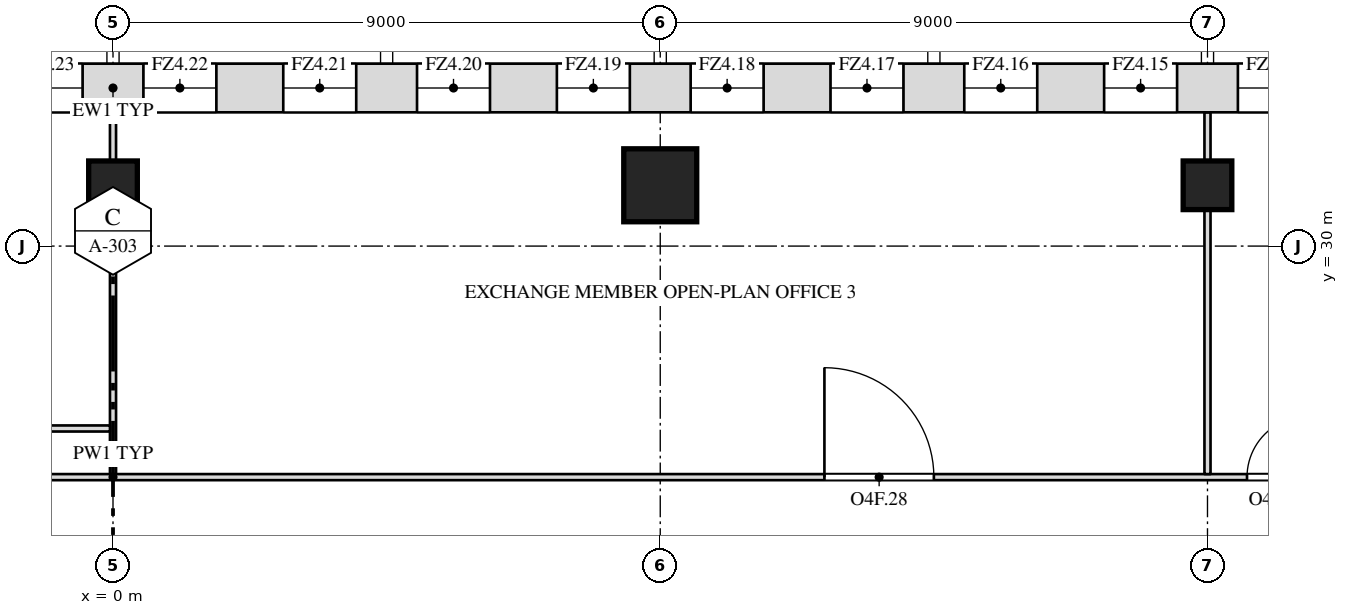
"""IFC4 building model, lengths in metres.
Left out: names, types, materials, properties, quantities, classifications, styles, units other than length and angle.
Written with IfcOpenShell. Run it as: python <this file> out.ifc"""

import sys

from ifc_helpers import new_model, si_unit, direction, frame, frame_2d, origin, origin_2d, place, context, subcontext, project, spatial, rectangle, extrude, element, fill, save


model = new_model("IFC4")
c1 = context("Model", 3, precision=1e-05, world=origin(), true_north=direction((0.0, 1.0)))
c2 = subcontext(c1, "Body", "Model", "MODEL_VIEW")
j1 = project(units=[si_unit("LENGTHUNIT", "METRE"), si_unit("PLANEANGLEUNIT", "RADIAN")], contexts=[c1])
p1 = place(None, origin())
s1 = spatial("IfcSite", under=j1, at=p1, CompositionType="ELEMENT")
p2 = place(p1, origin())
s2 = spatial("IfcBuilding", under=s1, at=p2, CompositionType="ELEMENT")
p3 = place(p2, frame((0.0, 0.0, 260.5)))
s3 = spatial("IfcBuildingStorey", under=s2, at=p3, CompositionType="ELEMENT", Elevation=260.5)
p4 = place(p3, frame((0.0, 31.0, 0.0), z_axis=(0.0, 0.0, 1.0), x_axis=(1.0, 0.0, 0.0)))
e1 = element("IfcColumn", 1, at=p4, inside=s3, PredefinedType="COLUMN", context=c2, shape_type="SweptSolid", body=[
    extrude(rectangle(XDim=0.8, YDim=0.8, at=origin_2d()), origin(), (0.0, 0.0, 1.0), 4.0),
])
p5 = place(p3, frame((9.0, 31.0, 0.0), z_axis=(0.0, 0.0, 1.0), x_axis=(1.0, 0.0, 0.0)))
e2 = element("IfcColumn", 2, at=p5, inside=s3, PredefinedType="COLUMN", context=c2, shape_type="SweptSolid", body=[
    extrude(rectangle(XDim=1.2, YDim=1.2, at=origin_2d()), origin(), (0.0, 0.0, 1.0), 4.0),
])
p6 = place(p3, frame((18.0, 31.0, 0.0), z_axis=(0.0, 0.0, 1.0), x_axis=(1.0, 0.0, 0.0)))
e3 = element("IfcColumn", 3, at=p6, inside=s3, PredefinedType="COLUMN", context=c2, shape_type="SweptSolid", body=[
    extrude(rectangle(XDim=0.8, YDim=0.8, at=origin_2d()), origin(), (0.0, 0.0, 1.0), 4.0),
])
p7 = place(p3, frame((-35.2, 26.2, 0.0), z_axis=(0.0, 0.0, 1.0), x_axis=(1.0, 0.0, 0.0)))
e4 = element("IfcWall", 4, at=p7, inside=s3, PredefinedType="PARTITIONING", context=c2, shape_type="SweptSolid", body=[
    extrude(rectangle(XDim=70.4, YDim=0.1, at=frame_2d((35.2, 0.0))), origin(), (0.0, 0.0, 1.0), 3.7),
])
p8 = place(p7, frame((10.9, 0.0, 0.0)))
e5 = element("IfcOpeningElement", 5, at=p8, cuts=e4, PredefinedType="OPENING", context=c2, shape_type="SweptSolid", body=[
    extrude(rectangle(XDim=1.0, YDim=2.1, at=frame_2d((0.5, 1.05))), frame((0.0, 0.062, 0.0), z_axis=(0.0, -1.0, 0.0), x_axis=(1.0, 0.0, 0.0)), (0.0, 0.0, 1.0), 0.124),
])
p9 = place(p7, frame((17.85, 0.0, 0.0)))
e6 = element("IfcOpeningElement", 6, at=p9, cuts=e4, PredefinedType="OPENING", context=c2, shape_type="SweptSolid", body=[
    extrude(rectangle(XDim=1.0, YDim=2.1, at=frame_2d((0.5, 1.05))), frame((0.0, 0.062, 0.0), z_axis=(0.0, -1.0, 0.0), x_axis=(1.0, 0.0, 0.0)), (0.0, 0.0, 1.0), 0.124),
])
p10 = place(p7, frame((46.9, 0.0, 0.0)))
e7 = element("IfcOpeningElement", 7, at=p10, cuts=e4, PredefinedType="OPENING", context=c2, shape_type="SweptSolid", body=[
    extrude(rectangle(XDim=1.8, YDim=2.1, at=frame_2d((0.9, 1.05))), frame((0.0, 0.062, 0.0), z_axis=(0.0, -1.0, 0.0), x_axis=(1.0, 0.0, 0.0)), (0.0, 0.0, 1.0), 0.124),
])
p11 = place(p7, frame((53.85, 0.0, 0.0)))
e8 = element("IfcOpeningElement", 8, at=p11, cuts=e4, PredefinedType="OPENING", context=c2, shape_type="SweptSolid", body=[
    extrude(rectangle(XDim=1.0, YDim=2.1, at=frame_2d((0.5, 1.05))), frame((0.0, 0.062, 0.0), z_axis=(0.0, -1.0, 0.0), x_axis=(1.0, 0.0, 0.0)), (0.0, 0.0, 1.0), 0.124),
])
p12 = place(p3, frame((0.0, 26.25, 0.0), z_axis=(0.0, 0.0, 1.0), x_axis=(0.0, 1.0, 0.0)))
e9 = element("IfcWall", 9, at=p12, inside=s3, PredefinedType="PARTITIONING", context=c2, shape_type="SweptSolid", body=[
    extrude(rectangle(XDim=4.35, YDim=0.1, at=frame_2d((2.175, 0.0))), origin(), (0.0, 0.0, 1.0), 3.093),
])
p13 = place(p3, frame((0.0, 31.4, 0.0), z_axis=(0.0, 0.0, 1.0), x_axis=(0.0, 1.0, 0.0)))
e10 = element("IfcWall", 10, at=p13, inside=s3, PredefinedType="PARTITIONING", context=c2, shape_type="SweptSolid", body=[
    extrude(rectangle(XDim=0.8, YDim=0.1, at=frame_2d((0.4, 0.0))), origin(), (0.0, 0.0, 1.0), 3.7),
])
p14 = place(p3, frame((18.0, 26.25, 0.0), z_axis=(0.0, 0.0, 1.0), x_axis=(0.0, 1.0, 0.0)))
e11 = element("IfcWall", 11, at=p14, inside=s3, PredefinedType="PARTITIONING", context=c2, shape_type="SweptSolid", body=[
    extrude(rectangle(XDim=4.35, YDim=0.1, at=frame_2d((2.175, 0.0))), origin(), (0.0, 0.0, 1.0), 3.093),
])
p15 = place(p3, frame((18.0, 31.4, 0.0), z_axis=(0.0, 0.0, 1.0), x_axis=(0.0, 1.0, 0.0)))
e12 = element("IfcWall", 12, at=p15, inside=s3, PredefinedType="PARTITIONING", context=c2, shape_type="SweptSolid", body=[
    extrude(rectangle(XDim=0.8, YDim=0.1, at=frame_2d((0.4, 0.0))), origin(), (0.0, 0.0, 1.0), 3.7),
])
p16 = place(p3, frame((-9.05, 27.0, 0.0), z_axis=(0.0, 0.0, 1.0), x_axis=(1.0, 0.0, 0.0)))
e13 = element("IfcWall", 13, at=p16, inside=s3, PredefinedType="PARTITIONING", context=c2, shape_type="SweptSolid", body=[
    extrude(rectangle(XDim=9.0, YDim=0.1, at=frame_2d((4.5, 0.0))), origin(), (0.0, 0.0, 1.0), 3.7),
])
p17 = place(p3, frame((29.948, 32.6, 0.0), z_axis=(0.0, 0.0, 1.0), x_axis=(-1.0, 0.0, 0.0)))
e14 = element("IfcWall", 14, at=p17, inside=s3, PredefinedType="SOLIDWALL", context=c2, shape_type="SweptSolid", body=[
    extrude(rectangle(XDim=59.895, YDim=0.8, at=frame_2d((29.948, 0.0))), origin(), (0.0, 0.0, 1.0), 3.7),
])
p18 = place(p17, frame((3.448, 0.0, 0.8)))
e15 = element("IfcOpeningElement", 15, at=p18, cuts=e14, PredefinedType="OPENING", context=c2, shape_type="SweptSolid", body=[
    extrude(rectangle(XDim=1.2, YDim=2.7, at=frame_2d((0.6, 1.35))), frame((0.0, 0.412, 0.0), z_axis=(0.0, -1.0, 0.0), x_axis=(1.0, 0.0, 0.0)), (0.0, 0.0, 1.0), 0.824),
])
p19 = place(p17, frame((5.748, 0.0, 0.8)))
e16 = element("IfcOpeningElement", 16, at=p19, cuts=e14, PredefinedType="OPENING", context=c2, shape_type="SweptSolid", body=[
    extrude(rectangle(XDim=1.2, YDim=2.7, at=frame_2d((0.6, 1.35))), frame((0.0, 0.412, 0.0), z_axis=(0.0, -1.0, 0.0), x_axis=(1.0, 0.0, 0.0)), (0.0, 0.0, 1.0), 0.824),
])
p20 = place(p17, frame((7.948, 0.0, 0.8)))
e17 = element("IfcOpeningElement", 17, at=p20, cuts=e14, PredefinedType="OPENING", context=c2, shape_type="SweptSolid", body=[
    extrude(rectangle(XDim=1.2, YDim=2.7, at=frame_2d((0.6, 1.35))), frame((0.0, 0.412, 0.0), z_axis=(0.0, -1.0, 0.0), x_axis=(1.0, 0.0, 0.0)), (0.0, 0.0, 1.0), 0.824),
])
p21 = place(p17, frame((10.248, 0.0, 0.8)))
e18 = element("IfcOpeningElement", 18, at=p21, cuts=e14, PredefinedType="OPENING", context=c2, shape_type="SweptSolid", body=[
    extrude(rectangle(XDim=1.2, YDim=2.7, at=frame_2d((0.6, 1.35))), frame((0.0, 0.412, 0.0), z_axis=(0.0, -1.0, 0.0), x_axis=(1.0, 0.0, 0.0)), (0.0, 0.0, 1.0), 0.824),
])
p22 = place(p17, frame((12.448, 0.0, 0.8)))
e19 = element("IfcOpeningElement", 19, at=p22, cuts=e14, PredefinedType="OPENING", context=c2, shape_type="SweptSolid", body=[
    extrude(rectangle(XDim=1.2, YDim=2.7, at=frame_2d((0.6, 1.35))), frame((0.0, 0.412, 0.0), z_axis=(0.0, -1.0, 0.0), x_axis=(1.0, 0.0, 0.0)), (0.0, 0.0, 1.0), 0.824),
])
p23 = place(p17, frame((14.748, 0.0, 0.8)))
e20 = element("IfcOpeningElement", 20, at=p23, cuts=e14, PredefinedType="OPENING", context=c2, shape_type="SweptSolid", body=[
    extrude(rectangle(XDim=1.2, YDim=2.7, at=frame_2d((0.6, 1.35))), frame((0.0, 0.412, 0.0), z_axis=(0.0, -1.0, 0.0), x_axis=(1.0, 0.0, 0.0)), (0.0, 0.0, 1.0), 0.824),
])
p24 = place(p17, frame((16.948, 0.0, 0.8)))
e21 = element("IfcOpeningElement", 21, at=p24, cuts=e14, PredefinedType="OPENING", context=c2, shape_type="SweptSolid", body=[
    extrude(rectangle(XDim=1.2, YDim=2.7, at=frame_2d((0.6, 1.35))), frame((0.0, 0.412, 0.0), z_axis=(0.0, -1.0, 0.0), x_axis=(1.0, 0.0, 0.0)), (0.0, 0.0, 1.0), 0.824),
])
p25 = place(p17, frame((19.248, 0.0, 0.8)))
e22 = element("IfcOpeningElement", 22, at=p25, cuts=e14, PredefinedType="OPENING", context=c2, shape_type="SweptSolid", body=[
    extrude(rectangle(XDim=1.2, YDim=2.7, at=frame_2d((0.6, 1.35))), frame((0.0, 0.412, 0.0), z_axis=(0.0, -1.0, 0.0), x_axis=(1.0, 0.0, 0.0)), (0.0, 0.0, 1.0), 0.824),
])
p26 = place(p17, frame((21.448, 0.0, 0.8)))
e23 = element("IfcOpeningElement", 23, at=p26, cuts=e14, PredefinedType="OPENING", context=c2, shape_type="SweptSolid", body=[
    extrude(rectangle(XDim=1.2, YDim=2.7, at=frame_2d((0.6, 1.35))), frame((0.0, 0.412, 0.0), z_axis=(0.0, -1.0, 0.0), x_axis=(1.0, 0.0, 0.0)), (0.0, 0.0, 1.0), 0.824),
])
p27 = place(p17, frame((23.748, 0.0, 0.8)))
e24 = element("IfcOpeningElement", 24, at=p27, cuts=e14, PredefinedType="OPENING", context=c2, shape_type="SweptSolid", body=[
    extrude(rectangle(XDim=1.2, YDim=2.7, at=frame_2d((0.6, 1.35))), frame((0.0, 0.412, 0.0), z_axis=(0.0, -1.0, 0.0), x_axis=(1.0, 0.0, 0.0)), (0.0, 0.0, 1.0), 0.824),
])
p28 = place(p17, frame((25.948, 0.0, 0.8)))
e25 = element("IfcOpeningElement", 25, at=p28, cuts=e14, PredefinedType="OPENING", context=c2, shape_type="SweptSolid", body=[
    extrude(rectangle(XDim=1.2, YDim=2.7, at=frame_2d((0.6, 1.35))), frame((0.0, 0.412, 0.0), z_axis=(0.0, -1.0, 0.0), x_axis=(1.0, 0.0, 0.0)), (0.0, 0.0, 1.0), 0.824),
])
p29 = place(p17, frame((28.248, 0.0, 0.8)))
e26 = element("IfcOpeningElement", 26, at=p29, cuts=e14, PredefinedType="OPENING", context=c2, shape_type="SweptSolid", body=[
    extrude(rectangle(XDim=1.2, YDim=2.7, at=frame_2d((0.6, 1.35))), frame((0.0, 0.412, 0.0), z_axis=(0.0, -1.0, 0.0), x_axis=(1.0, 0.0, 0.0)), (0.0, 0.0, 1.0), 0.824),
])
p30 = place(p17, frame((30.448, 0.0, 0.8)))
e27 = element("IfcOpeningElement", 27, at=p30, cuts=e14, PredefinedType="OPENING", context=c2, shape_type="SweptSolid", body=[
    extrude(rectangle(XDim=1.2, YDim=2.7, at=frame_2d((0.6, 1.35))), frame((0.0, 0.412, 0.0), z_axis=(0.0, -1.0, 0.0), x_axis=(1.0, 0.0, 0.0)), (0.0, 0.0, 1.0), 0.824),
])
p31 = place(p17, frame((32.748, 0.0, 0.8)))
e28 = element("IfcOpeningElement", 28, at=p31, cuts=e14, PredefinedType="OPENING", context=c2, shape_type="SweptSolid", body=[
    extrude(rectangle(XDim=1.2, YDim=2.7, at=frame_2d((0.6, 1.35))), frame((0.0, 0.412, 0.0), z_axis=(0.0, -1.0, 0.0), x_axis=(1.0, 0.0, 0.0)), (0.0, 0.0, 1.0), 0.824),
])
p32 = place(p17, frame((34.948, 0.0, 0.8)))
e29 = element("IfcOpeningElement", 29, at=p32, cuts=e14, PredefinedType="OPENING", context=c2, shape_type="SweptSolid", body=[
    extrude(rectangle(XDim=1.2, YDim=2.7, at=frame_2d((0.6, 1.35))), frame((0.0, 0.412, 0.0), z_axis=(0.0, -1.0, 0.0), x_axis=(1.0, 0.0, 0.0)), (0.0, 0.0, 1.0), 0.824),
])
p33 = place(p17, frame((37.248, 0.0, 0.8)))
e30 = element("IfcOpeningElement", 30, at=p33, cuts=e14, PredefinedType="OPENING", context=c2, shape_type="SweptSolid", body=[
    extrude(rectangle(XDim=1.2, YDim=2.7, at=frame_2d((0.6, 1.35))), frame((0.0, 0.412, 0.0), z_axis=(0.0, -1.0, 0.0), x_axis=(1.0, 0.0, 0.0)), (0.0, 0.0, 1.0), 0.824),
])
p34 = place(p17, frame((39.448, 0.0, 0.8)))
e31 = element("IfcOpeningElement", 31, at=p34, cuts=e14, PredefinedType="OPENING", context=c2, shape_type="SweptSolid", body=[
    extrude(rectangle(XDim=1.2, YDim=2.7, at=frame_2d((0.6, 1.35))), frame((0.0, 0.412, 0.0), z_axis=(0.0, -1.0, 0.0), x_axis=(1.0, 0.0, 0.0)), (0.0, 0.0, 1.0), 0.824),
])
p35 = place(p17, frame((41.748, 0.0, 0.8)))
e32 = element("IfcOpeningElement", 32, at=p35, cuts=e14, PredefinedType="OPENING", context=c2, shape_type="SweptSolid", body=[
    extrude(rectangle(XDim=1.2, YDim=2.7, at=frame_2d((0.6, 1.35))), frame((0.0, 0.412, 0.0), z_axis=(0.0, -1.0, 0.0), x_axis=(1.0, 0.0, 0.0)), (0.0, 0.0, 1.0), 0.824),
])
p36 = place(p17, frame((43.948, 0.0, 0.8)))
e33 = element("IfcOpeningElement", 33, at=p36, cuts=e14, PredefinedType="OPENING", context=c2, shape_type="SweptSolid", body=[
    extrude(rectangle(XDim=1.2, YDim=2.7, at=frame_2d((0.6, 1.35))), frame((0.0, 0.412, 0.0), z_axis=(0.0, -1.0, 0.0), x_axis=(1.0, 0.0, 0.0)), (0.0, 0.0, 1.0), 0.824),
])
p37 = place(p17, frame((46.248, 0.0, 0.8)))
e34 = element("IfcOpeningElement", 34, at=p37, cuts=e14, PredefinedType="OPENING", context=c2, shape_type="SweptSolid", body=[
    extrude(rectangle(XDim=1.2, YDim=2.7, at=frame_2d((0.6, 1.35))), frame((0.0, 0.412, 0.0), z_axis=(0.0, -1.0, 0.0), x_axis=(1.0, 0.0, 0.0)), (0.0, 0.0, 1.0), 0.824),
])
p38 = place(p17, frame((48.448, 0.0, 0.8)))
e35 = element("IfcOpeningElement", 35, at=p38, cuts=e14, PredefinedType="OPENING", context=c2, shape_type="SweptSolid", body=[
    extrude(rectangle(XDim=1.2, YDim=2.7, at=frame_2d((0.6, 1.35))), frame((0.0, 0.412, 0.0), z_axis=(0.0, -1.0, 0.0), x_axis=(1.0, 0.0, 0.0)), (0.0, 0.0, 1.0), 0.824),
])
p39 = place(p17, frame((50.748, 0.0, 0.8)))
e36 = element("IfcOpeningElement", 36, at=p39, cuts=e14, PredefinedType="OPENING", context=c2, shape_type="SweptSolid", body=[
    extrude(rectangle(XDim=1.2, YDim=2.7, at=frame_2d((0.6, 1.35))), frame((0.0, 0.412, 0.0), z_axis=(0.0, -1.0, 0.0), x_axis=(1.0, 0.0, 0.0)), (0.0, 0.0, 1.0), 0.824),
])
p40 = place(p17, frame((52.948, 0.0, 0.8)))
e37 = element("IfcOpeningElement", 37, at=p40, cuts=e14, PredefinedType="OPENING", context=c2, shape_type="SweptSolid", body=[
    extrude(rectangle(XDim=1.2, YDim=2.7, at=frame_2d((0.6, 1.35))), frame((0.0, 0.412, 0.0), z_axis=(0.0, -1.0, 0.0), x_axis=(1.0, 0.0, 0.0)), (0.0, 0.0, 1.0), 0.824),
])
p41 = place(p17, frame((55.248, 0.0, 0.8)))
e38 = element("IfcOpeningElement", 38, at=p41, cuts=e14, PredefinedType="OPENING", context=c2, shape_type="SweptSolid", body=[
    extrude(rectangle(XDim=1.2, YDim=2.7, at=frame_2d((0.6, 1.35))), frame((0.0, 0.412, 0.0), z_axis=(0.0, -1.0, 0.0), x_axis=(1.0, 0.0, 0.0)), (0.0, 0.0, 1.0), 0.824),
])
p42 = place(p10, origin())
e39 = element("IfcDoor", 39, at=p42, inside=s3, OperationType="DOUBLE_DOOR_SINGLE_SWING", PredefinedType="DOOR", context=c2, shape_type="SweptSolid", body=[
    extrude(rectangle(XDim=1.8, YDim=2.1, at=frame_2d((0.9, 1.05))), frame((0.0, 0.025, 0.0), z_axis=(0.0, -1.0, 0.0), x_axis=(1.0, 0.0, 0.0)), (0.0, 0.0, 1.0), 0.05),
])
fill(e7, e39)
p43 = place(p11, origin())
e40 = element("IfcDoor", 40, at=p43, inside=s3, OperationType="SINGLE_SWING_RIGHT", PredefinedType="DOOR", context=c2, shape_type="SweptSolid", body=[
    extrude(rectangle(XDim=1.0, YDim=2.1, at=frame_2d((0.5, 1.05))), frame((0.0, 0.025, 0.0), z_axis=(0.0, -1.0, 0.0), x_axis=(1.0, 0.0, 0.0)), (0.0, 0.0, 1.0), 0.05),
])
fill(e8, e40)
p44 = place(p21, origin())
e41 = element("IfcWindow", 41, at=p44, inside=s3, PartitioningType="SINGLE_PANEL", PredefinedType="WINDOW", context=c2, shape_type="SweptSolid", body=[
    extrude(rectangle(XDim=1.2, YDim=2.7, at=frame_2d((0.6, 1.35))), frame((0.0, 0.03, 0.0), z_axis=(0.0, -1.0, 0.0), x_axis=(1.0, 0.0, 0.0)), (0.0, 0.0, 1.0), 0.06),
])
fill(e18, e41)
p45 = place(p22, origin())
e42 = element("IfcWindow", 42, at=p45, inside=s3, PartitioningType="SINGLE_PANEL", PredefinedType="WINDOW", context=c2, shape_type="SweptSolid", body=[
    extrude(rectangle(XDim=1.2, YDim=2.7, at=frame_2d((0.6, 1.35))), frame((0.0, 0.03, 0.0), z_axis=(0.0, -1.0, 0.0), x_axis=(1.0, 0.0, 0.0)), (0.0, 0.0, 1.0), 0.06),
])
fill(e19, e42)
p46 = place(p23, origin())
e43 = element("IfcWindow", 43, at=p46, inside=s3, PartitioningType="SINGLE_PANEL", PredefinedType="WINDOW", context=c2, shape_type="SweptSolid", body=[
    extrude(rectangle(XDim=1.2, YDim=2.7, at=frame_2d((0.6, 1.35))), frame((0.0, 0.03, 0.0), z_axis=(0.0, -1.0, 0.0), x_axis=(1.0, 0.0, 0.0)), (0.0, 0.0, 1.0), 0.06),
])
fill(e20, e43)
p47 = place(p24, origin())
e44 = element("IfcWindow", 44, at=p47, inside=s3, PartitioningType="SINGLE_PANEL", PredefinedType="WINDOW", context=c2, shape_type="SweptSolid", body=[
    extrude(rectangle(XDim=1.2, YDim=2.7, at=frame_2d((0.6, 1.35))), frame((0.0, 0.03, 0.0), z_axis=(0.0, -1.0, 0.0), x_axis=(1.0, 0.0, 0.0)), (0.0, 0.0, 1.0), 0.06),
])
fill(e21, e44)
p48 = place(p25, origin())
e45 = element("IfcWindow", 45, at=p48, inside=s3, PartitioningType="SINGLE_PANEL", PredefinedType="WINDOW", context=c2, shape_type="SweptSolid", body=[
    extrude(rectangle(XDim=1.2, YDim=2.7, at=frame_2d((0.6, 1.35))), frame((0.0, 0.03, 0.0), z_axis=(0.0, -1.0, 0.0), x_axis=(1.0, 0.0, 0.0)), (0.0, 0.0, 1.0), 0.06),
])
fill(e22, e45)
p49 = place(p26, origin())
e46 = element("IfcWindow", 46, at=p49, inside=s3, PartitioningType="SINGLE_PANEL", PredefinedType="WINDOW", context=c2, shape_type="SweptSolid", body=[
    extrude(rectangle(XDim=1.2, YDim=2.7, at=frame_2d((0.6, 1.35))), frame((0.0, 0.03, 0.0), z_axis=(0.0, -1.0, 0.0), x_axis=(1.0, 0.0, 0.0)), (0.0, 0.0, 1.0), 0.06),
])
fill(e23, e46)
p50 = place(p27, origin())
e47 = element("IfcWindow", 47, at=p50, inside=s3, PartitioningType="SINGLE_PANEL", PredefinedType="WINDOW", context=c2, shape_type="SweptSolid", body=[
    extrude(rectangle(XDim=1.2, YDim=2.7, at=frame_2d((0.6, 1.35))), frame((0.0, 0.03, 0.0), z_axis=(0.0, -1.0, 0.0), x_axis=(1.0, 0.0, 0.0)), (0.0, 0.0, 1.0), 0.06),
])
fill(e24, e47)
p51 = place(p28, origin())
e48 = element("IfcWindow", 48, at=p51, inside=s3, PartitioningType="SINGLE_PANEL", PredefinedType="WINDOW", context=c2, shape_type="SweptSolid", body=[
    extrude(rectangle(XDim=1.2, YDim=2.7, at=frame_2d((0.6, 1.35))), frame((0.0, 0.03, 0.0), z_axis=(0.0, -1.0, 0.0), x_axis=(1.0, 0.0, 0.0)), (0.0, 0.0, 1.0), 0.06),
])
fill(e25, e48)
p52 = place(p29, origin())
e49 = element("IfcWindow", 49, at=p52, inside=s3, PartitioningType="SINGLE_PANEL", PredefinedType="WINDOW", context=c2, shape_type="SweptSolid", body=[
    extrude(rectangle(XDim=1.2, YDim=2.7, at=frame_2d((0.6, 1.35))), frame((0.0, 0.03, 0.0), z_axis=(0.0, -1.0, 0.0), x_axis=(1.0, 0.0, 0.0)), (0.0, 0.0, 1.0), 0.06),
])
fill(e26, e49)
p53 = place(p30, origin())
e50 = element("IfcWindow", 50, at=p53, inside=s3, PartitioningType="SINGLE_PANEL", PredefinedType="WINDOW", context=c2, shape_type="SweptSolid", body=[
    extrude(rectangle(XDim=1.2, YDim=2.7, at=frame_2d((0.6, 1.35))), frame((0.0, 0.03, 0.0), z_axis=(0.0, -1.0, 0.0), x_axis=(1.0, 0.0, 0.0)), (0.0, 0.0, 1.0), 0.06),
])
fill(e27, e50)
save(model, sys.argv[1])
